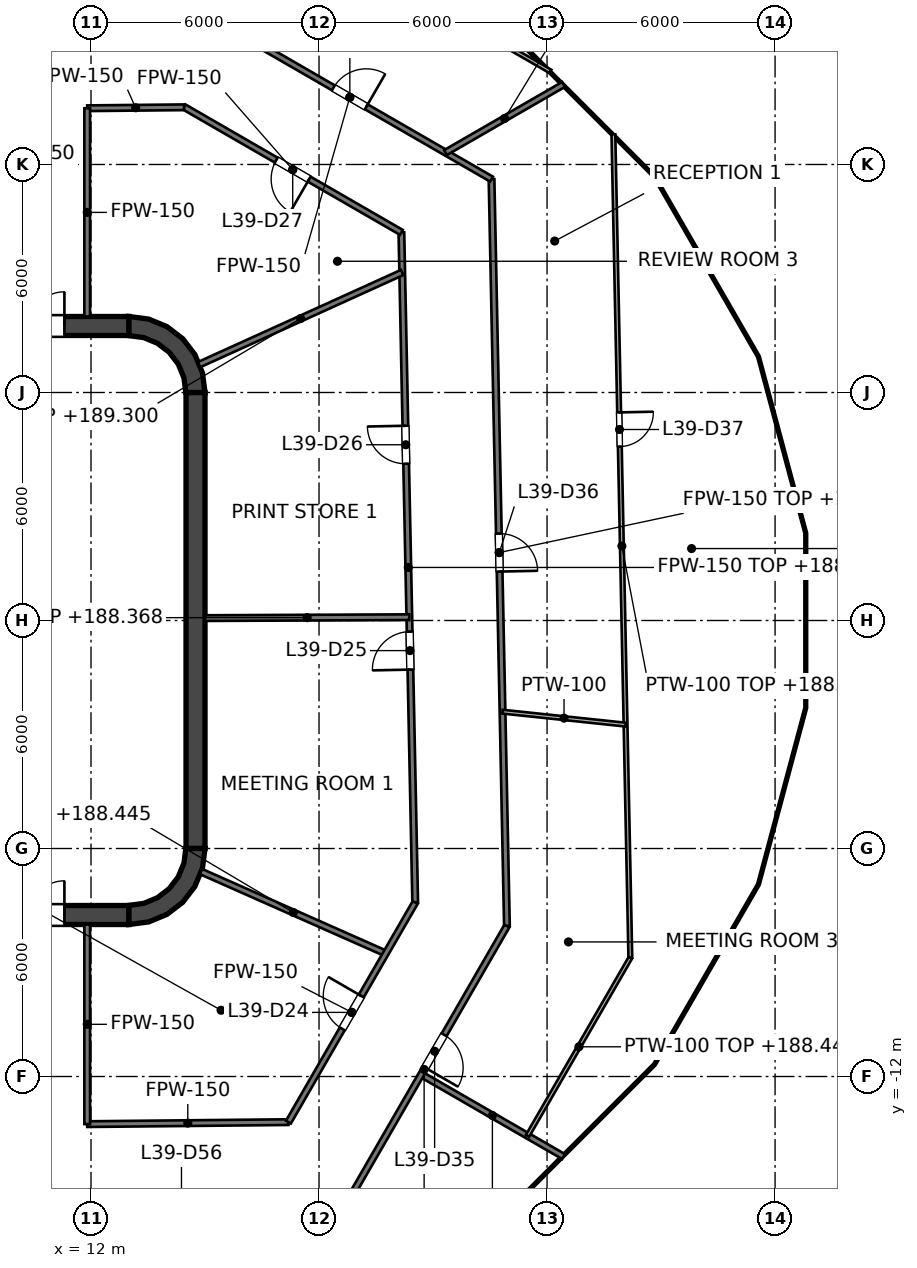
"""IFC4 building model, lengths in metres.
Left out: names, types, materials, properties, quantities, classifications, styles, units other than length and angle.
Written with IfcOpenShell. Run it as: python <this file> out.ifc"""

import sys

from ifc_helpers import new_model, si_unit, direction, frame, frame_2d, origin, place, context, subcontext, project, spatial, polyline, rectangle, outline, extrude, element, fill, save


model = new_model("IFC4")
c1 = context("Model", 3, precision=1e-05, world=origin(), true_north=direction((0.0, 1.0)))
c2 = subcontext(c1, "Body", "Model", "MODEL_VIEW")
j1 = project(units=[si_unit("LENGTHUNIT", "METRE"), si_unit("PLANEANGLEUNIT", "RADIAN")], contexts=[c1])
p1 = place(None, origin())
s1 = spatial("IfcSite", under=j1, at=p1, CompositionType="ELEMENT")
p2 = place(p1, origin())
s2 = spatial("IfcBuilding", under=s1, at=p2, CompositionType="ELEMENT")
p3 = place(p2, frame((0.0, 0.0, 185.6)))
s3 = spatial("IfcBuildingStorey", under=s2, at=p3, CompositionType="ELEMENT", Elevation=185.6)
p4 = place(p3, frame((-13.0, 7.75, 0.0), z_axis=(0.0, 0.0, 1.0), x_axis=(1.0, 0.0, 0.0)))
e1 = element("IfcWall", 1, at=p4, inside=s3, PredefinedType="SHEAR", context=c2, shape_type="SweptSolid", body=[
    extrude(rectangle(XDim=26.0, YDim=0.5, at=frame_2d((13.0, 0.0))), origin(), (0.0, 0.0, 1.0), 4.0),
])
p5 = place(p4, frame((1.7, 0.0, 0.0)))
e2 = element("IfcOpeningElement", 2, at=p5, cuts=e1, PredefinedType="OPENING", context=c2, shape_type="SweptSolid", body=[
    extrude(rectangle(XDim=1.8, YDim=2.1, at=frame_2d((0.9, 1.05))), frame((0.0, 0.25, 0.0), z_axis=(0.0, -1.0, 0.0), x_axis=(1.0, 0.0, 0.0)), (0.0, 0.0, 1.0), 0.5),
])
p6 = place(p4, frame((22.5, 0.0, 0.0)))
e3 = element("IfcOpeningElement", 3, at=p6, cuts=e1, PredefinedType="OPENING", context=c2, shape_type="SweptSolid", body=[
    extrude(rectangle(XDim=1.8, YDim=2.1, at=frame_2d((0.9, 1.05))), frame((0.0, 0.25, 0.0), z_axis=(0.0, -1.0, 0.0), x_axis=(1.0, 0.0, 0.0)), (0.0, 0.0, 1.0), 0.5),
])
p7 = place(p3, frame((-13.0, -7.75, 0.0), z_axis=(0.0, 0.0, 1.0), x_axis=(1.0, 0.0, 0.0)))
e4 = element("IfcWall", 4, at=p7, inside=s3, PredefinedType="SHEAR", context=c2, shape_type="SweptSolid", body=[
    extrude(rectangle(XDim=26.0, YDim=0.5, at=frame_2d((13.0, 0.0))), origin(), (0.0, 0.0, 1.0), 4.0),
])
p8 = place(p7, frame((1.7, 0.0, 0.0)))
e5 = element("IfcOpeningElement", 5, at=p8, cuts=e4, PredefinedType="OPENING", context=c2, shape_type="SweptSolid", body=[
    extrude(rectangle(XDim=1.8, YDim=2.1, at=frame_2d((0.9, 1.05))), frame((0.0, 0.25, 0.0), z_axis=(0.0, -1.0, 0.0), x_axis=(1.0, 0.0, 0.0)), (0.0, 0.0, 1.0), 0.5),
])
p9 = place(p7, frame((22.5, 0.0, 0.0)))
e6 = element("IfcOpeningElement", 6, at=p9, cuts=e4, PredefinedType="OPENING", context=c2, shape_type="SweptSolid", body=[
    extrude(rectangle(XDim=1.8, YDim=2.1, at=frame_2d((0.9, 1.05))), frame((0.0, 0.25, 0.0), z_axis=(0.0, -1.0, 0.0), x_axis=(1.0, 0.0, 0.0)), (0.0, 0.0, 1.0), 0.5),
])
p10 = place(p3, frame((14.75, -6.0, 0.0), z_axis=(0.0, 0.0, 1.0), x_axis=(0.0, 1.0, 0.0)))
e7 = element("IfcWall", 7, at=p10, inside=s3, PredefinedType="SHEAR", context=c2, shape_type="SweptSolid", body=[
    extrude(rectangle(XDim=12.0, YDim=0.5, at=frame_2d((6.0, 0.0))), origin(), (0.0, 0.0, 1.0), 4.0),
])
p11 = place(p3, origin())
e8 = element("IfcWall", 8, at=p11, inside=s3, PredefinedType="SHEAR", context=c2, shape_type="SweptSolid", body=[
    extrude(outline(polyline([(13.0, 8.0), (13.0, 7.496), (13.387, 7.445), (13.748, 7.295), (14.058, 7.058), (14.295, 6.748), (14.445, 6.387), (14.496, 6.0), (15.0, 6.0), (14.932, 6.518), (14.732, 7.0), (14.414, 7.414), (14.0, 7.732), (13.518, 7.932), (13.0, 8.0)])), origin(), (0.0, 0.0, 1.0), 4.0),
])
e9 = element("IfcWall", 9, at=p11, inside=s3, PredefinedType="SHEAR", context=c2, shape_type="SweptSolid", body=[
    extrude(outline(polyline([(15.0, -6.0), (14.496, -6.0), (14.445, -6.387), (14.295, -6.748), (14.058, -7.058), (13.748, -7.295), (13.387, -7.445), (13.0, -7.496), (13.0, -8.0), (13.518, -7.932), (14.0, -7.732), (14.414, -7.414), (14.732, -7.0), (14.932, -6.518), (15.0, -6.0)])), origin(), (0.0, 0.0, 1.0), 4.0),
])
p12 = place(p3, frame((11.8, -7.5, 0.0), z_axis=(0.0, 0.0, 1.0), x_axis=(0.0, 1.0, 0.0)))
e10 = element("IfcWall", 10, at=p12, inside=s3, PredefinedType="SOLIDWALL", context=c2, shape_type="SweptSolid", body=[
    extrude(rectangle(XDim=15.0, YDim=0.4, at=frame_2d((7.5, 0.0))), origin(), (0.0, 0.0, 1.0), 3.85),
])
p13 = place(p12, frame((11.3, 0.0, 0.0)))
e11 = element("IfcOpeningElement", 11, at=p13, cuts=e10, PredefinedType="OPENING", context=c2, shape_type="SweptSolid", body=[
    extrude(rectangle(XDim=1.1, YDim=2.1, at=frame_2d((0.55, 1.05))), frame((0.0, 0.2, 0.0), z_axis=(0.0, -1.0, 0.0), x_axis=(1.0, 0.0, 0.0)), (0.0, 0.0, 1.0), 0.4),
])
p14 = place(p12, frame((8.4, 0.0, 0.0)))
e12 = element("IfcOpeningElement", 12, at=p14, cuts=e10, PredefinedType="OPENING", context=c2, shape_type="SweptSolid", body=[
    extrude(rectangle(XDim=1.1, YDim=2.1, at=frame_2d((0.55, 1.05))), frame((0.0, 0.2, 0.0), z_axis=(0.0, -1.0, 0.0), x_axis=(1.0, 0.0, 0.0)), (0.0, 0.0, 1.0), 0.4),
])
p15 = place(p12, frame((5.5, 0.0, 0.0)))
e13 = element("IfcOpeningElement", 13, at=p15, cuts=e10, PredefinedType="OPENING", context=c2, shape_type="SweptSolid", body=[
    extrude(rectangle(XDim=1.1, YDim=2.1, at=frame_2d((0.55, 1.05))), frame((0.0, 0.2, 0.0), z_axis=(0.0, -1.0, 0.0), x_axis=(1.0, 0.0, 0.0)), (0.0, 0.0, 1.0), 0.4),
])
p16 = place(p12, frame((13.697, 0.0, 0.0)))
e14 = element("IfcOpeningElement", 14, at=p16, cuts=e10, PredefinedType="OPENING", context=c2, shape_type="SweptSolid", body=[
    extrude(rectangle(XDim=0.9, YDim=2.1, at=frame_2d((0.45, 1.05))), frame((0.0, 0.2, 0.0), z_axis=(0.0, -1.0, 0.0), x_axis=(1.0, 0.0, 0.0)), (0.0, 0.0, 1.0), 0.4),
])
p17 = place(p12, frame((0.403, 0.0, 0.0)))
e15 = element("IfcOpeningElement", 15, at=p17, cuts=e10, PredefinedType="OPENING", context=c2, shape_type="SweptSolid", body=[
    extrude(rectangle(XDim=0.9, YDim=2.1, at=frame_2d((0.45, 1.05))), frame((0.0, 0.2, 0.0), z_axis=(0.0, -1.0, 0.0), x_axis=(1.0, 0.0, 0.0)), (0.0, 0.0, 1.0), 0.4),
])
e16 = element("IfcWall", 16, at=p11, inside=s3, PredefinedType="SOLIDWALL", context=c2, shape_type="SweptSolid", body=[
    extrude(outline(polyline([(12.0, -5.675), (12.0, -5.925), (14.25, -5.925), (14.5, -5.925), (14.5, -5.675), (14.5, -3.025), (14.5, -2.775), (14.5, -0.125), (14.5, 0.125), (14.5, 2.775), (14.5, 3.025), (14.5, 5.675), (14.5, 5.925), (14.25, 5.925), (12.0, 5.925), (12.0, 5.675), (14.25, 5.675), (14.25, 3.025), (12.0, 3.025), (12.0, 2.775), (14.25, 2.775), (14.25, 0.125), (12.0, 0.125), (12.0, -0.125), (14.25, -0.125), (14.25, -2.775), (12.0, -2.775), (12.0, -3.025), (14.25, -3.025), (14.25, -5.675), (12.0, -5.675)])), origin(), (0.0, 0.0, 1.0), 3.85),
])
p18 = place(p3, frame((20.167, 10.213, 0.0), z_axis=(0.0, 0.0, 1.0), x_axis=(0.020624730832, -0.999787287616, 0.0)))
e17 = element("IfcWall", 17, at=p18, inside=s3, PredefinedType="PARTITIONING", context=c2, shape_type="SweptSolid", body=[
    extrude(rectangle(XDim=17.637, YDim=0.15, at=frame_2d((8.819, 0.0))), origin(), (0.0, 0.0, 1.0), 2.768),
])
p19 = place(p18, frame((10.508, 0.0, 0.0)))
e18 = element("IfcOpeningElement", 18, at=p19, cuts=e17, PredefinedType="OPENING", context=c2, shape_type="SweptSolid", body=[
    extrude(rectangle(XDim=1.0, YDim=2.1, at=frame_2d((0.5, 1.05))), frame((0.0, 0.075, 0.0), z_axis=(0.0, -1.0, 0.0), x_axis=(1.0, 0.0, 0.0)), (0.0, 0.0, 1.0), 0.15),
])
p20 = place(p18, frame((5.089, 0.0, 0.0)))
e19 = element("IfcOpeningElement", 19, at=p20, cuts=e17, PredefinedType="OPENING", context=c2, shape_type="SweptSolid", body=[
    extrude(rectangle(XDim=1.0, YDim=2.1, at=frame_2d((0.5, 1.05))), frame((0.0, 0.075, 0.0), z_axis=(0.0, -1.0, 0.0), x_axis=(1.0, 0.0, 0.0)), (0.0, 0.0, 1.0), 0.15),
])
p21 = place(p3, frame((22.539, 11.615, 0.0), z_axis=(0.0, 0.0, 1.0), x_axis=(0.020626332176, -0.99978725458, 0.0)))
e20 = element("IfcWall", 20, at=p21, inside=s3, PredefinedType="PARTITIONING", context=c2, shape_type="SweptSolid", body=[
    extrude(rectangle(XDim=19.66, YDim=0.15, at=frame_2d((9.83, 0.0))), origin(), (0.0, 0.0, 1.0), 2.768),
])
p22 = place(p21, frame((9.33, 0.0, 0.0)))
e21 = element("IfcOpeningElement", 21, at=p22, cuts=e20, PredefinedType="OPENING", context=c2, shape_type="SweptSolid", body=[
    extrude(rectangle(XDim=1.0, YDim=2.1, at=frame_2d((0.5, 1.05))), frame((0.0, 0.075, 0.0), z_axis=(0.0, -1.0, 0.0), x_axis=(1.0, 0.0, 0.0)), (0.0, 0.0, 1.0), 0.15),
])
p23 = place(p3, frame((20.69, -11.945, 0.0), z_axis=(0.0, 0.0, 1.0), x_axis=(0.866048255864, -0.499960416948, 0.0)))
e22 = element("IfcWall", 22, at=p23, inside=s3, PredefinedType="PARTITIONING", context=c2, shape_type="SweptSolid", body=[
    extrude(rectangle(XDim=4.322, YDim=0.15, at=frame_2d((2.161, 0.0))), origin(), (0.0, 0.0, 1.0), 2.845),
])
p24 = place(p3, frame((14.448, 13.515, 0.0), z_axis=(0.0, 0.0, 1.0), x_axis=(0.866032288321, -0.499988075443, 0.0)))
e23 = element("IfcWall", 23, at=p24, inside=s3, PredefinedType="PARTITIONING", context=c2, shape_type="SweptSolid", body=[
    extrude(rectangle(XDim=6.604, YDim=0.15, at=frame_2d((3.302, 0.0))), origin(), (0.0, 0.0, 1.0), 2.777),
])
p25 = place(p24, frame((2.802, 0.0, 0.0)))
e24 = element("IfcOpeningElement", 24, at=p25, cuts=e23, PredefinedType="OPENING", context=c2, shape_type="SweptSolid", body=[
    extrude(rectangle(XDim=1.0, YDim=2.1, at=frame_2d((0.5, 1.05))), frame((0.0, 0.075, 0.0), z_axis=(0.0, -1.0, 0.0), x_axis=(1.0, 0.0, 0.0)), (0.0, 0.0, 1.0), 0.15),
])
p26 = place(p3, frame((15.08, 15.921, 0.0), z_axis=(0.0, 0.0, 1.0), x_axis=(0.866020838546, -0.500007907142, 0.0)))
e25 = element("IfcWall", 25, at=p26, inside=s3, PredefinedType="PARTITIONING", context=c2, shape_type="SweptSolid", body=[
    extrude(rectangle(XDim=8.613, YDim=0.15, at=frame_2d((4.306, 0.0))), origin(), (0.0, 0.0, 1.0), 2.777),
])
p27 = place(p26, frame((3.808, 0.0, 0.0)))
e26 = element("IfcOpeningElement", 26, at=p27, cuts=e25, PredefinedType="OPENING", context=c2, shape_type="SweptSolid", body=[
    extrude(rectangle(XDim=1.0, YDim=2.1, at=frame_2d((0.5, 1.05))), frame((0.0, 0.075, 0.0), z_axis=(0.0, -1.0, 0.0), x_axis=(1.0, 0.0, 0.0)), (0.0, 0.0, 1.0), 0.15),
])
p28 = place(p3, frame((14.895, -6.607, 0.0), z_axis=(0.0, 0.0, 1.0), x_axis=(0.914233271379, -0.405188259337, 0.0)))
e27 = element("IfcWall", 27, at=p28, inside=s3, PredefinedType="PARTITIONING", context=c2, shape_type="SweptSolid", body=[
    extrude(rectangle(XDim=5.317, YDim=0.15, at=frame_2d((2.659, 0.0))), origin(), (0.0, 0.0, 1.0), 2.845),
])
p29 = place(p3, frame((15.0, 0.063, 0.0), z_axis=(0.0, 0.0, 1.0), x_axis=(0.999990294223, 0.004405843865, 0.0)))
e28 = element("IfcWall", 28, at=p29, inside=s3, PredefinedType="PARTITIONING", context=c2, shape_type="SweptSolid", body=[
    extrude(rectangle(XDim=5.375, YDim=0.15, at=frame_2d((2.688, 0.0))), origin(), (0.0, 0.0, 1.0), 2.768),
])
p30 = place(p3, frame((11.9, -13.253, 0.0), z_axis=(0.0, 0.0, 1.0), x_axis=(0.999951309192, 0.009868092237, 0.0)))
e29 = element("IfcWall", 29, at=p30, inside=s3, PredefinedType="PARTITIONING", context=c2, shape_type="SweptSolid", body=[
    extrude(rectangle(XDim=5.294, YDim=0.15, at=frame_2d((2.647, 0.0))), origin(), (0.0, 0.0, 1.0), 2.777),
])
p31 = place(p3, frame((11.9, 13.48, 0.0), z_axis=(0.0, 0.0, 1.0), x_axis=(0.999951307579, 0.009868255694, 0.0)))
e30 = element("IfcWall", 30, at=p31, inside=s3, PredefinedType="PARTITIONING", context=c2, shape_type="SweptSolid", body=[
    extrude(rectangle(XDim=2.548, YDim=0.15, at=frame_2d((1.274, 0.0))), origin(), (0.0, 0.0, 1.0), 2.777),
])
p32 = place(p3, frame((14.843, 6.733, 0.0), z_axis=(0.0, 0.0, 1.0), x_axis=(0.910628361306, 0.413226315214, 0.0)))
e31 = element("IfcWall", 31, at=p32, inside=s3, PredefinedType="PARTITIONING", context=c2, shape_type="SweptSolid", body=[
    extrude(rectangle(XDim=5.87, YDim=0.15, at=frame_2d((2.935, 0.0))), origin(), (0.0, 0.0, 1.0), 3.7),
])
p33 = place(p3, frame((21.329, 12.314, 0.0), z_axis=(0.0, 0.0, 1.0), x_axis=(0.866038125567, 0.499977964579, 0.0)))
e32 = element("IfcWall", 32, at=p33, inside=s3, PredefinedType="PARTITIONING", context=c2, shape_type="SweptSolid", body=[
    extrude(rectangle(XDim=3.584, YDim=0.15, at=frame_2d((1.792, 0.0))), origin(), (0.0, 0.0, 1.0), 2.845),
])
p34 = place(p3, frame((18.587, -15.587, 0.0), z_axis=(0.0, 0.0, 1.0), x_axis=(0.499960140076, 0.866048415699, 0.0)))
e33 = element("IfcWall", 33, at=p34, inside=s3, PredefinedType="PARTITIONING", context=c2, shape_type="SweptSolid", body=[
    extrude(rectangle(XDim=8.714, YDim=0.15, at=frame_2d((4.357, 0.0))), origin(), (0.0, 0.0, 1.0), 2.777),
])
p35 = place(p34, frame((4.41, 0.0, 0.0)))
e34 = element("IfcOpeningElement", 34, at=p35, cuts=e33, PredefinedType="OPENING", context=c2, shape_type="SweptSolid", body=[
    extrude(rectangle(XDim=1.0, YDim=2.1, at=frame_2d((0.5, 1.05))), frame((0.0, 0.075, 0.0), z_axis=(0.0, -1.0, 0.0), x_axis=(1.0, 0.0, 0.0)), (0.0, 0.0, 1.0), 0.15),
])
p36 = place(p3, frame((17.194, -13.201, 0.0), z_axis=(0.0, 0.0, 1.0), x_axis=(0.499955744085, 0.866050953441, 0.0)))
e35 = element("IfcWall", 35, at=p36, inside=s3, PredefinedType="PARTITIONING", context=c2, shape_type="SweptSolid", body=[
    extrude(rectangle(XDim=6.673, YDim=0.15, at=frame_2d((3.337, 0.0))), origin(), (0.0, 0.0, 1.0), 2.777),
])
p37 = place(p36, frame((2.835, 0.0, 0.0)))
e36 = element("IfcOpeningElement", 36, at=p37, cuts=e35, PredefinedType="OPENING", context=c2, shape_type="SweptSolid", body=[
    extrude(rectangle(XDim=1.0, YDim=2.1, at=frame_2d((0.5, 1.05))), frame((0.0, 0.075, 0.0), z_axis=(0.0, -1.0, 0.0), x_axis=(1.0, 0.0, 0.0)), (0.0, 0.0, 1.0), 0.15),
])
p38 = place(p3, frame((11.9, -13.253, 0.0), z_axis=(0.0, 0.0, 1.0), x_axis=(0.0, 1.0, 0.0)))
e37 = element("IfcWall", 37, at=p38, inside=s3, PredefinedType="PARTITIONING", context=c2, shape_type="SweptSolid", body=[
    extrude(rectangle(XDim=5.253, YDim=0.15, at=frame_2d((2.626, 0.0))), origin(), (0.0, 0.0, 1.0), 2.777),
])
p39 = place(p3, frame((11.9, 8.0, 0.0), z_axis=(0.0, 0.0, 1.0), x_axis=(0.0, 1.0, 0.0)))
e38 = element("IfcWall", 38, at=p39, inside=s3, PredefinedType="PARTITIONING", context=c2, shape_type="SweptSolid", body=[
    extrude(rectangle(XDim=5.479, YDim=0.15, at=frame_2d((2.74, 0.0))), origin(), (0.0, 0.0, 1.0), 2.777),
])
p40 = place(p3, frame((25.746, 12.794, 0.0), z_axis=(0.0, 0.0, 1.0), x_axis=(0.020556718749, -0.999788688331, 0.0)))
e39 = element("IfcWall", 39, at=p40, inside=s3, PredefinedType="PARTITIONING", context=c2, shape_type="SweptSolid", body=[
    extrude(rectangle(XDim=21.675, YDim=0.1, at=frame_2d((10.837, 0.0))), origin(), (0.0, 0.0, 1.0), 2.768),
])
p41 = place(p40, frame((7.32, 0.0, 0.0)))
e40 = element("IfcOpeningElement", 40, at=p41, cuts=e39, PredefinedType="OPENING", context=c2, shape_type="SweptSolid", body=[
    extrude(rectangle(XDim=0.9, YDim=2.1, at=frame_2d((0.45, 1.05))), frame((0.0, 0.05, 0.0), z_axis=(0.0, -1.0, 0.0), x_axis=(1.0, 0.0, 0.0)), (0.0, 0.0, 1.0), 0.1),
])
p42 = place(p3, frame((15.931, 19.16, 0.0), z_axis=(0.0, 0.0, 1.0), x_axis=(0.86598056092, -0.500077662076, 0.0)))
e41 = element("IfcWall", 41, at=p42, inside=s3, PredefinedType="PARTITIONING", context=c2, shape_type="SweptSolid", body=[
    extrude(rectangle(XDim=9.42, YDim=0.1, at=frame_2d((4.71, 0.0))), origin(), (0.0, 0.0, 1.0), 2.777),
])
p43 = place(p3, frame((22.828, -2.399, 0.0), z_axis=(0.0, 0.0, 1.0), x_axis=(0.994498465997, -0.104751139033, 0.0)))
e42 = element("IfcWall", 42, at=p43, inside=s3, PredefinedType="PARTITIONING", context=c2, shape_type="SweptSolid", body=[
    extrude(rectangle(XDim=3.256, YDim=0.1, at=frame_2d((1.628, 0.0))), origin(), (0.0, 0.0, 1.0), 3.7),
])
p44 = place(p3, frame((23.487, -13.56, 0.0), z_axis=(0.0, 0.0, 1.0), x_axis=(0.500066272392, 0.86598713802, 0.0)))
e43 = element("IfcWall", 43, at=p44, inside=s3, PredefinedType="PARTITIONING", context=c2, shape_type="SweptSolid", body=[
    extrude(rectangle(XDim=5.409, YDim=0.1, at=frame_2d((2.705, 0.0))), origin(), (0.0, 0.0, 1.0), 2.845),
])
p45 = place(p13, origin())
e44 = element("IfcDoor", 44, at=p45, inside=s3, OperationType="DOUBLE_DOOR_SLIDING", PredefinedType="DOOR", context=c2, shape_type="SweptSolid", body=[
    extrude(rectangle(XDim=1.1, YDim=2.1, at=frame_2d((0.55, 1.05))), frame((0.0, 0.025, 0.0), z_axis=(0.0, -1.0, 0.0), x_axis=(1.0, 0.0, 0.0)), (0.0, 0.0, 1.0), 0.05),
])
fill(e11, e44)
p46 = place(p14, origin())
e45 = element("IfcDoor", 45, at=p46, inside=s3, OperationType="DOUBLE_DOOR_SLIDING", PredefinedType="DOOR", context=c2, shape_type="SweptSolid", body=[
    extrude(rectangle(XDim=1.1, YDim=2.1, at=frame_2d((0.55, 1.05))), frame((0.0, 0.025, 0.0), z_axis=(0.0, -1.0, 0.0), x_axis=(1.0, 0.0, 0.0)), (0.0, 0.0, 1.0), 0.05),
])
fill(e12, e45)
p47 = place(p15, origin())
e46 = element("IfcDoor", 46, at=p47, inside=s3, OperationType="DOUBLE_DOOR_SLIDING", PredefinedType="DOOR", context=c2, shape_type="SweptSolid", body=[
    extrude(rectangle(XDim=1.1, YDim=2.1, at=frame_2d((0.55, 1.05))), frame((0.0, 0.025, 0.0), z_axis=(0.0, -1.0, 0.0), x_axis=(1.0, 0.0, 0.0)), (0.0, 0.0, 1.0), 0.05),
])
fill(e13, e46)
p48 = place(p16, origin())
e47 = element("IfcDoor", 47, at=p48, inside=s3, OperationType="SINGLE_SWING_RIGHT", PredefinedType="DOOR", context=c2, shape_type="SweptSolid", body=[
    extrude(rectangle(XDim=0.9, YDim=2.1, at=frame_2d((0.45, 1.05))), frame((0.0, 0.025, 0.0), z_axis=(0.0, -1.0, 0.0), x_axis=(1.0, 0.0, 0.0)), (0.0, 0.0, 1.0), 0.05),
])
fill(e14, e47)
p49 = place(p17, origin())
e48 = element("IfcDoor", 48, at=p49, inside=s3, OperationType="SINGLE_SWING_RIGHT", PredefinedType="DOOR", context=c2, shape_type="SweptSolid", body=[
    extrude(rectangle(XDim=0.9, YDim=2.1, at=frame_2d((0.45, 1.05))), frame((0.0, 0.025, 0.0), z_axis=(0.0, -1.0, 0.0), x_axis=(1.0, 0.0, 0.0)), (0.0, 0.0, 1.0), 0.05),
])
fill(e15, e48)
p50 = place(p6, origin())
e49 = element("IfcDoor", 49, at=p50, inside=s3, OperationType="DOUBLE_DOOR_SINGLE_SWING", PredefinedType="DOOR", context=c2, shape_type="SweptSolid", body=[
    extrude(rectangle(XDim=1.8, YDim=2.1, at=frame_2d((0.9, 1.05))), frame((0.0, 0.025, 0.0), z_axis=(0.0, -1.0, 0.0), x_axis=(1.0, 0.0, 0.0)), (0.0, 0.0, 1.0), 0.05),
])
fill(e3, e49)
p51 = place(p9, origin())
e50 = element("IfcDoor", 50, at=p51, inside=s3, OperationType="DOUBLE_DOOR_SINGLE_SWING", PredefinedType="DOOR", context=c2, shape_type="SweptSolid", body=[
    extrude(rectangle(XDim=1.8, YDim=2.1, at=frame_2d((0.9, 1.05))), frame((0.0, 0.025, 0.0), z_axis=(0.0, -1.0, 0.0), x_axis=(1.0, 0.0, 0.0)), (0.0, 0.0, 1.0), 0.05),
])
fill(e6, e50)
p52 = place(p37, origin())
e51 = element("IfcDoor", 51, at=p52, inside=s3, OperationType="SINGLE_SWING_RIGHT", PredefinedType="DOOR", context=c2, shape_type="SweptSolid", body=[
    extrude(rectangle(XDim=1.0, YDim=2.1, at=frame_2d((0.5, 1.05))), frame((0.0, 0.025, 0.0), z_axis=(0.0, -1.0, 0.0), x_axis=(1.0, 0.0, 0.0)), (0.0, 0.0, 1.0), 0.05),
])
fill(e36, e51)
p53 = place(p19, origin())
e52 = element("IfcDoor", 52, at=p53, inside=s3, OperationType="SINGLE_SWING_RIGHT", PredefinedType="DOOR", context=c2, shape_type="SweptSolid", body=[
    extrude(rectangle(XDim=1.0, YDim=2.1, at=frame_2d((0.5, 1.05))), frame((0.0, 0.025, 0.0), z_axis=(0.0, -1.0, 0.0), x_axis=(1.0, 0.0, 0.0)), (0.0, 0.0, 1.0), 0.05),
])
fill(e18, e52)
p54 = place(p20, origin())
e53 = element("IfcDoor", 53, at=p54, inside=s3, OperationType="SINGLE_SWING_LEFT", PredefinedType="DOOR", context=c2, shape_type="SweptSolid", body=[
    extrude(rectangle(XDim=1.0, YDim=2.1, at=frame_2d((0.5, 1.05))), frame((0.0, 0.025, 0.0), z_axis=(0.0, -1.0, 0.0), x_axis=(1.0, 0.0, 0.0)), (0.0, 0.0, 1.0), 0.05),
])
fill(e19, e53)
p55 = place(p25, origin())
e54 = element("IfcDoor", 54, at=p55, inside=s3, OperationType="SINGLE_SWING_RIGHT", PredefinedType="DOOR", context=c2, shape_type="SweptSolid", body=[
    extrude(rectangle(XDim=1.0, YDim=2.1, at=frame_2d((0.5, 1.05))), frame((0.0, 0.025, 0.0), z_axis=(0.0, -1.0, 0.0), x_axis=(1.0, 0.0, 0.0)), (0.0, 0.0, 1.0), 0.05),
])
fill(e24, e54)
p56 = place(p35, origin())
e55 = element("IfcDoor", 55, at=p56, inside=s3, OperationType="SINGLE_SWING_LEFT", PredefinedType="DOOR", context=c2, shape_type="SweptSolid", body=[
    extrude(rectangle(XDim=1.0, YDim=2.1, at=frame_2d((0.5, 1.05))), frame((0.0, 0.025, 0.0), z_axis=(0.0, -1.0, 0.0), x_axis=(1.0, 0.0, 0.0)), (0.0, 0.0, 1.0), 0.05),
])
fill(e34, e55)
p57 = place(p22, origin())
e56 = element("IfcDoor", 56, at=p57, inside=s3, OperationType="SINGLE_SWING_RIGHT", PredefinedType="DOOR", context=c2, shape_type="SweptSolid", body=[
    extrude(rectangle(XDim=1.0, YDim=2.1, at=frame_2d((0.5, 1.05))), frame((0.0, 0.025, 0.0), z_axis=(0.0, -1.0, 0.0), x_axis=(1.0, 0.0, 0.0)), (0.0, 0.0, 1.0), 0.05),
])
fill(e21, e56)
p58 = place(p41, origin())
e57 = element("IfcDoor", 57, at=p58, inside=s3, OperationType="SINGLE_SWING_LEFT", PredefinedType="DOOR", context=c2, shape_type="SweptSolid", body=[
    extrude(rectangle(XDim=0.9, YDim=2.1, at=frame_2d((0.45, 1.05))), frame((0.0, 0.025, 0.0), z_axis=(0.0, -1.0, 0.0), x_axis=(1.0, 0.0, 0.0)), (0.0, 0.0, 1.0), 0.05),
])
fill(e40, e57)
p59 = place(p27, origin())
e58 = element("IfcDoor", 58, at=p59, inside=s3, OperationType="SINGLE_SWING_RIGHT", PredefinedType="DOOR", context=c2, shape_type="SweptSolid", body=[
    extrude(rectangle(XDim=1.0, YDim=2.1, at=frame_2d((0.5, 1.05))), frame((0.0, 0.025, 0.0), z_axis=(0.0, -1.0, 0.0), x_axis=(1.0, 0.0, 0.0)), (0.0, 0.0, 1.0), 0.05),
])
fill(e26, e58)
save(model, sys.argv[1])
